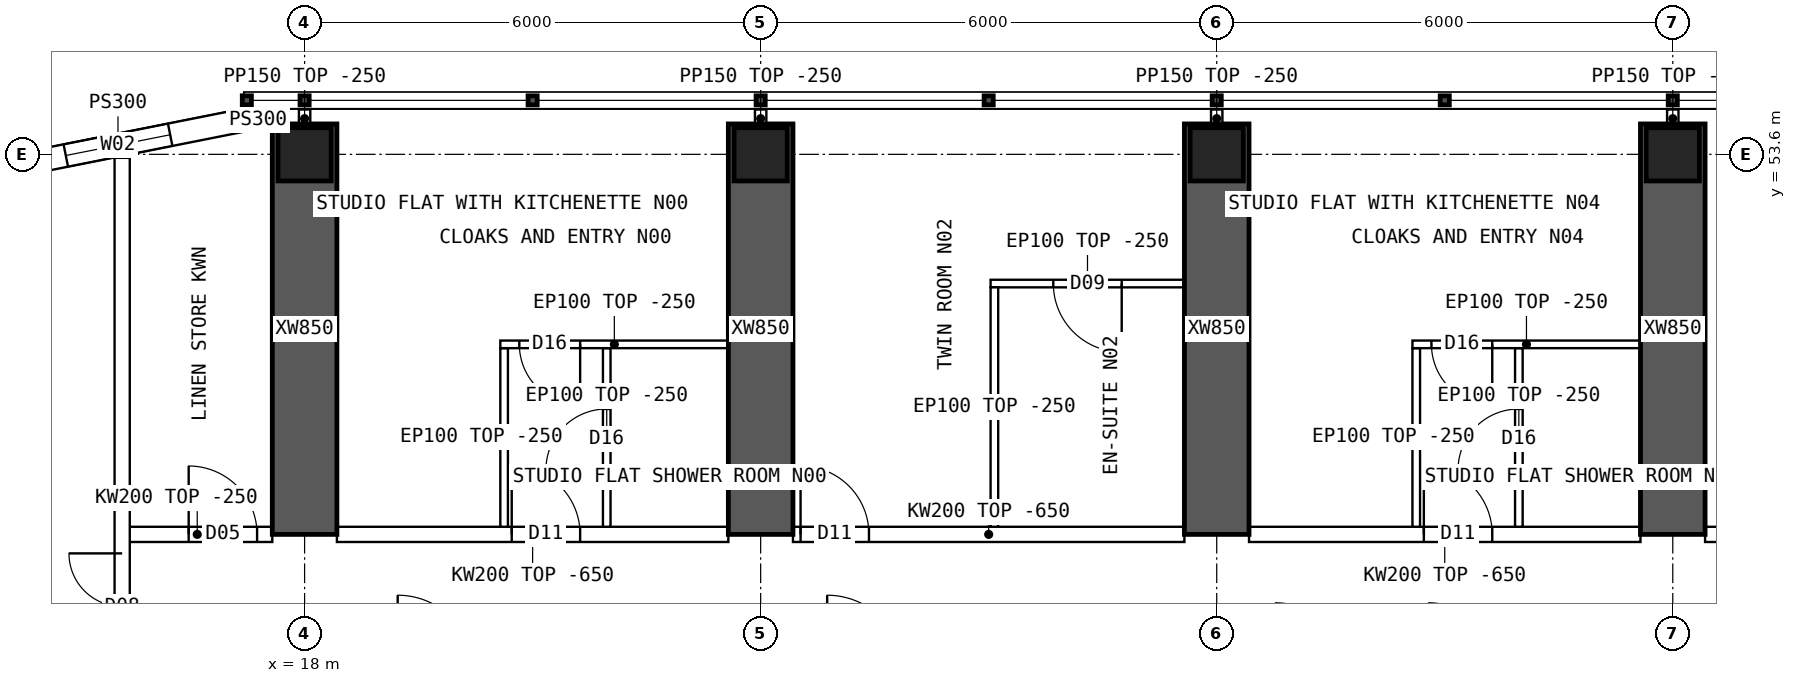
"""IFC4 building model, lengths in metres.
Left out: names, types, materials, properties, quantities, classifications, styles, units other than length and angle.
Written with IfcOpenShell. Run it as: python <this file> out.ifc"""

import sys

from ifc_helpers import new_model, si_unit, direction, frame, frame_2d, origin, origin_2d, place, context, subcontext, project, spatial, polyline, rectangle, hollow_rectangle, outline, extrude, element, fill, save


model = new_model("IFC4")
c1 = context("Model", 3, precision=1e-05, world=origin(), true_north=direction((0.0, 1.0)))
c2 = subcontext(c1, "Body", "Model", "MODEL_VIEW")
j1 = project(units=[si_unit("LENGTHUNIT", "METRE"), si_unit("PLANEANGLEUNIT", "RADIAN")], contexts=[c1])
p1 = place(None, origin())
s1 = spatial("IfcSite", under=j1, at=p1, CompositionType="ELEMENT")
p2 = place(p1, origin())
s2 = spatial("IfcBuilding", under=s1, at=p2, CompositionType="ELEMENT")
p3 = place(p2, frame((0.0, 0.0, 178.6)))
s3 = spatial("IfcBuildingStorey", under=s2, at=p3, CompositionType="ELEMENT", Elevation=178.6)
for number, where, z_axis, x_axis in (
    (1, (18.0, 53.6, 0.0), (0.0, 0.0, 1.0), (1.0, 0.0, 0.0)),
    (2, (24.0, 53.6, 0.0), (0.0, 0.0, 1.0), (1.0, 0.0, 0.0)),
    (3, (30.0, 53.6, 0.0), (0.0, 0.0, 1.0), (1.0, 0.0, 0.0)),
    (4, (36.0, 53.6, 0.0), (0.0, 0.0, 1.0), (1.0, 0.0, 0.0)),
):
    element("IfcColumn", number, at=place(p3, frame(where, z_axis=z_axis, x_axis=x_axis)), inside=s3, PredefinedType="COLUMN", context=c2, shape_type="SweptSolid", body=[
        extrude(hollow_rectangle(XDim=0.7, YDim=0.7, WallThickness=0.07, at=origin_2d()), origin(), (0.0, 0.0, 1.0), 3.75),
    ])
for number, where, z_axis, x_axis in (
    (5, (18.0, 48.6, 0.0), (0.0, 0.0, 1.0), (0.0, 1.0, 0.0)),
    (6, (24.0, 48.6, 0.0), (0.0, 0.0, 1.0), (0.0, 1.0, 0.0)),
    (7, (30.0, 48.6, 0.0), (0.0, 0.0, 1.0), (0.0, 1.0, 0.0)),
    (8, (36.0, 48.6, 0.0), (0.0, 0.0, 1.0), (0.0, 1.0, 0.0)),
):
    element("IfcWall", number, at=place(p3, frame(where, z_axis=z_axis, x_axis=x_axis)), inside=s3, PredefinedType="SHEAR", context=c2, shape_type="SweptSolid", body=[
        extrude(rectangle(XDim=5.4, YDim=0.85, at=frame_2d((2.7, 0.0))), origin(), (0.0, 0.0, 1.0), 3.75),
    ])
p4 = place(p3, frame((17.2, 54.05, 0.0), z_axis=(0.0, 0.0, 1.0), x_axis=(-0.98078325777, -0.195100490205, 0.0)))
e9 = element("IfcWall", 9, at=p4, inside=s3, PredefinedType="SOLIDWALL", context=c2, shape_type="SweptSolid", body=[
    extrude(outline(polyline([(-0.03, -0.15), (3.405, -0.15), (3.345, 0.15), (0.03, 0.15), (-0.03, -0.15)])), origin(), (0.0, 0.0, 1.0), 3.5),
])
p5 = place(p4, frame((0.988, 0.0, 0.9)))
e10 = element("IfcOpeningElement", 10, at=p5, cuts=e9, PredefinedType="OPENING", context=c2, shape_type="SweptSolid", body=[
    extrude(rectangle(XDim=1.4, YDim=1.8, at=frame_2d((0.7, 0.9))), frame((0.0, 0.16, 0.0), z_axis=(0.0, -1.0, 0.0), x_axis=(1.0, 0.0, 0.0)), (0.0, 0.0, 1.0), 0.32),
])
p6 = place(p3, frame((17.2, 54.05, 0.0), z_axis=(0.0, 0.0, 1.0), x_axis=(1.0, 0.0, 0.0)))
e11 = element("IfcWall", 11, at=p6, inside=s3, PredefinedType="SOLIDWALL", context=c2, shape_type="SweptSolid", body=[
    extrude(rectangle(XDim=0.375, YDim=0.3, at=frame_2d((0.188, 0.0))), origin(), (0.0, 0.0, 1.0), 3.5),
])
p7 = place(p3, frame((15.6, 48.6, 0.0), z_axis=(0.0, 0.0, 1.0), x_axis=(1.0, 0.0, 0.0)))
e12 = element("IfcWall", 12, at=p7, inside=s3, PredefinedType="SOLIDWALL", context=c2, shape_type="SweptSolid", body=[
    extrude(rectangle(XDim=1.975, YDim=0.2, at=frame_2d((0.987, 0.0))), origin(), (0.0, 0.0, 1.0), 3.5),
])
p8 = place(p7, frame((0.875, 0.0, 0.0)))
e13 = element("IfcOpeningElement", 13, at=p8, cuts=e12, PredefinedType="OPENING", context=c2, shape_type="SweptSolid", body=[
    extrude(rectangle(XDim=0.9, YDim=2.1, at=frame_2d((0.45, 1.05))), frame((0.0, 0.11, 0.0), z_axis=(0.0, -1.0, 0.0), x_axis=(1.0, 0.0, 0.0)), (0.0, 0.0, 1.0), 0.22),
])
p9 = place(p3, frame((18.425, 48.6, 0.0), z_axis=(0.0, 0.0, 1.0), x_axis=(1.0, 0.0, 0.0)))
e14 = element("IfcWall", 14, at=p9, inside=s3, PredefinedType="SOLIDWALL", context=c2, shape_type="SweptSolid", body=[
    extrude(outline(polyline([(0.0, 0.0), (5.15, 0.0), (5.15, 3.1), (0.0, 3.1), (0.0, 0.0)])), frame((0.0, 0.1, 0.0), z_axis=(0.0, -1.0, 0.0), x_axis=(1.0, 0.0, 0.0)), (0.0, 0.0, 1.0), 0.2),
])
p10 = place(p9, frame((2.3, 0.0, 0.0)))
e15 = element("IfcOpeningElement", 15, at=p10, cuts=e14, PredefinedType="OPENING", context=c2, shape_type="SweptSolid", body=[
    extrude(rectangle(XDim=0.9, YDim=2.1, at=frame_2d((0.45, 1.05))), frame((0.0, 0.11, 0.0), z_axis=(0.0, -1.0, 0.0), x_axis=(1.0, 0.0, 0.0)), (0.0, 0.0, 1.0), 0.22),
])
p11 = place(p3, frame((24.425, 48.6, 0.0), z_axis=(0.0, 0.0, 1.0), x_axis=(1.0, 0.0, 0.0)))
e16 = element("IfcWall", 16, at=p11, inside=s3, PredefinedType="SOLIDWALL", context=c2, shape_type="SweptSolid", body=[
    extrude(outline(polyline([(0.0, 0.0), (5.15, 0.0), (5.15, 3.1), (0.0, 3.1), (0.0, 0.0)])), frame((0.0, 0.1, 0.0), z_axis=(0.0, -1.0, 0.0), x_axis=(1.0, 0.0, 0.0)), (0.0, 0.0, 1.0), 0.2),
])
p12 = place(p11, frame((0.1, 0.0, 0.0)))
e17 = element("IfcOpeningElement", 17, at=p12, cuts=e16, PredefinedType="OPENING", context=c2, shape_type="SweptSolid", body=[
    extrude(rectangle(XDim=0.9, YDim=2.1, at=frame_2d((0.45, 1.05))), frame((0.0, 0.11, 0.0), z_axis=(0.0, -1.0, 0.0), x_axis=(1.0, 0.0, 0.0)), (0.0, 0.0, 1.0), 0.22),
])
p13 = place(p3, frame((30.425, 48.6, 0.0), z_axis=(0.0, 0.0, 1.0), x_axis=(1.0, 0.0, 0.0)))
e18 = element("IfcWall", 18, at=p13, inside=s3, PredefinedType="SOLIDWALL", context=c2, shape_type="SweptSolid", body=[
    extrude(outline(polyline([(0.0, 0.0), (5.15, 0.0), (5.15, 3.1), (0.0, 3.1), (0.0, 0.0)])), frame((0.0, 0.1, 0.0), z_axis=(0.0, -1.0, 0.0), x_axis=(1.0, 0.0, 0.0)), (0.0, 0.0, 1.0), 0.2),
])
p14 = place(p13, frame((2.3, 0.0, 0.0)))
e19 = element("IfcOpeningElement", 19, at=p14, cuts=e18, PredefinedType="OPENING", context=c2, shape_type="SweptSolid", body=[
    extrude(rectangle(XDim=0.9, YDim=2.1, at=frame_2d((0.45, 1.05))), frame((0.0, 0.11, 0.0), z_axis=(0.0, -1.0, 0.0), x_axis=(1.0, 0.0, 0.0)), (0.0, 0.0, 1.0), 0.22),
])
p15 = place(p3, frame((36.425, 48.6, 0.0), z_axis=(0.0, 0.0, 1.0), x_axis=(1.0, 0.0, 0.0)))
e20 = element("IfcWall", 20, at=p15, inside=s3, PredefinedType="SOLIDWALL", context=c2, shape_type="SweptSolid", body=[
    extrude(outline(polyline([(0.0, 0.0), (5.15, 0.0), (5.15, 3.1), (0.0, 3.1), (0.0, 0.0)])), frame((0.0, 0.1, 0.0), z_axis=(0.0, -1.0, 0.0), x_axis=(1.0, 0.0, 0.0)), (0.0, 0.0, 1.0), 0.2),
])
p16 = place(p15, frame((0.3, 0.0, 0.0)))
e21 = element("IfcOpeningElement", 21, at=p16, cuts=e20, PredefinedType="OPENING", context=c2, shape_type="SweptSolid", body=[
    extrude(rectangle(XDim=1.0, YDim=2.1, at=frame_2d((0.5, 1.05))), frame((0.0, 0.11, 0.0), z_axis=(0.0, -1.0, 0.0), x_axis=(1.0, 0.0, 0.0)), (0.0, 0.0, 1.0), 0.22),
])
p17 = place(p3, frame((20.575, 51.1, 0.0), z_axis=(0.0, 0.0, 1.0), x_axis=(1.0, 0.0, 0.0)))
e22 = element("IfcWall", 22, at=p17, inside=s3, PredefinedType="PARTITIONING", context=c2, shape_type="SweptSolid", body=[
    extrude(rectangle(XDim=3.0, YDim=0.1, at=frame_2d((1.5, 0.0))), origin(), (0.0, 0.0, 1.0), 3.5),
])
p18 = place(p17, frame((0.25, 0.0, 0.0)))
e23 = element("IfcOpeningElement", 23, at=p18, cuts=e22, PredefinedType="OPENING", context=c2, shape_type="SweptSolid", body=[
    extrude(rectangle(XDim=0.8, YDim=2.1, at=frame_2d((0.4, 1.05))), frame((0.0, 0.06, 0.0), z_axis=(0.0, -1.0, 0.0), x_axis=(1.0, 0.0, 0.0)), (0.0, 0.0, 1.0), 0.12),
])
p19 = place(p3, frame((20.625, 51.05, 0.0), z_axis=(0.0, 0.0, 1.0), x_axis=(0.0, -1.0, 0.0)))
e24 = element("IfcWall", 24, at=p19, inside=s3, PredefinedType="PARTITIONING", context=c2, shape_type="SweptSolid", body=[
    extrude(outline(polyline([(0.0, 0.0), (2.35, 0.0), (2.35, 3.1), (2.302, 3.1), (2.3, 3.5), (0.0, 3.5), (0.0, 0.0)])), frame((0.0, 0.05, 0.0), z_axis=(0.0, -1.0, 0.0), x_axis=(1.0, 0.0, 0.0)), (0.0, 0.0, 1.0), 0.1),
])
p20 = place(p3, frame((21.975, 51.05, 0.0), z_axis=(0.0, 0.0, 1.0), x_axis=(0.0, -1.0, 0.0)))
e25 = element("IfcWall", 25, at=p20, inside=s3, PredefinedType="PARTITIONING", context=c2, shape_type="SweptSolid", body=[
    extrude(outline(polyline([(0.0, 0.0), (2.35, 0.0), (2.35, 3.1), (2.302, 3.1), (2.3, 3.5), (0.0, 3.5), (0.0, 0.0)])), frame((0.0, 0.05, 0.0), z_axis=(0.0, -1.0, 0.0), x_axis=(1.0, 0.0, 0.0)), (0.0, 0.0, 1.0), 0.1),
])
p21 = place(p20, frame((0.8, 0.0, 0.0)))
e26 = element("IfcOpeningElement", 26, at=p21, cuts=e25, PredefinedType="OPENING", context=c2, shape_type="SweptSolid", body=[
    extrude(rectangle(XDim=0.8, YDim=2.1, at=frame_2d((0.4, 1.05))), frame((0.0, 0.06, 0.0), z_axis=(0.0, -1.0, 0.0), x_axis=(1.0, 0.0, 0.0)), (0.0, 0.0, 1.0), 0.12),
])
p22 = place(p3, frame((27.025, 51.9, 0.0), z_axis=(0.0, 0.0, 1.0), x_axis=(1.0, 0.0, 0.0)))
e27 = element("IfcWall", 27, at=p22, inside=s3, PredefinedType="PARTITIONING", context=c2, shape_type="SweptSolid", body=[
    extrude(rectangle(XDim=2.55, YDim=0.1, at=frame_2d((1.275, 0.0))), origin(), (0.0, 0.0, 1.0), 3.5),
])
p23 = place(p22, frame((0.825, 0.0, 0.0)))
e28 = element("IfcOpeningElement", 28, at=p23, cuts=e27, PredefinedType="OPENING", context=c2, shape_type="SweptSolid", body=[
    extrude(rectangle(XDim=0.9, YDim=2.1, at=frame_2d((0.45, 1.05))), frame((0.0, 0.06, 0.0), z_axis=(0.0, -1.0, 0.0), x_axis=(1.0, 0.0, 0.0)), (0.0, 0.0, 1.0), 0.12),
])
p24 = place(p3, frame((27.075, 51.85, 0.0), z_axis=(0.0, 0.0, 1.0), x_axis=(0.0, -1.0, 0.0)))
e29 = element("IfcWall", 29, at=p24, inside=s3, PredefinedType="PARTITIONING", context=c2, shape_type="SweptSolid", body=[
    extrude(outline(polyline([(0.0, 0.0), (3.15, 0.0), (3.15, 3.1), (3.102, 3.1), (3.1, 3.5), (0.0, 3.5), (0.0, 0.0)])), frame((0.0, 0.05, 0.0), z_axis=(0.0, -1.0, 0.0), x_axis=(1.0, 0.0, 0.0)), (0.0, 0.0, 1.0), 0.1),
])
p25 = place(p3, frame((32.575, 51.1, 0.0), z_axis=(0.0, 0.0, 1.0), x_axis=(1.0, 0.0, 0.0)))
e30 = element("IfcWall", 30, at=p25, inside=s3, PredefinedType="PARTITIONING", context=c2, shape_type="SweptSolid", body=[
    extrude(rectangle(XDim=3.0, YDim=0.1, at=frame_2d((1.5, 0.0))), origin(), (0.0, 0.0, 1.0), 3.5),
])
p26 = place(p25, frame((0.25, 0.0, 0.0)))
e31 = element("IfcOpeningElement", 31, at=p26, cuts=e30, PredefinedType="OPENING", context=c2, shape_type="SweptSolid", body=[
    extrude(rectangle(XDim=0.8, YDim=2.1, at=frame_2d((0.4, 1.05))), frame((0.0, 0.06, 0.0), z_axis=(0.0, -1.0, 0.0), x_axis=(1.0, 0.0, 0.0)), (0.0, 0.0, 1.0), 0.12),
])
p27 = place(p3, frame((32.625, 51.05, 0.0), z_axis=(0.0, 0.0, 1.0), x_axis=(0.0, -1.0, 0.0)))
e32 = element("IfcWall", 32, at=p27, inside=s3, PredefinedType="PARTITIONING", context=c2, shape_type="SweptSolid", body=[
    extrude(outline(polyline([(0.0, 0.0), (2.35, 0.0), (2.35, 3.1), (2.302, 3.1), (2.3, 3.5), (0.0, 3.5), (0.0, 0.0)])), frame((0.0, 0.05, 0.0), z_axis=(0.0, -1.0, 0.0), x_axis=(1.0, 0.0, 0.0)), (0.0, 0.0, 1.0), 0.1),
])
p28 = place(p3, frame((33.975, 51.05, 0.0), z_axis=(0.0, 0.0, 1.0), x_axis=(0.0, -1.0, 0.0)))
e33 = element("IfcWall", 33, at=p28, inside=s3, PredefinedType="PARTITIONING", context=c2, shape_type="SweptSolid", body=[
    extrude(outline(polyline([(0.0, 0.0), (2.35, 0.0), (2.35, 3.1), (2.302, 3.1), (2.3, 3.5), (0.0, 3.5), (0.0, 0.0)])), frame((0.0, 0.05, 0.0), z_axis=(0.0, -1.0, 0.0), x_axis=(1.0, 0.0, 0.0)), (0.0, 0.0, 1.0), 0.1),
])
p29 = place(p28, frame((0.8, 0.0, 0.0)))
e34 = element("IfcOpeningElement", 34, at=p29, cuts=e33, PredefinedType="OPENING", context=c2, shape_type="SweptSolid", body=[
    extrude(rectangle(XDim=0.8, YDim=2.1, at=frame_2d((0.4, 1.05))), frame((0.0, 0.06, 0.0), z_axis=(0.0, -1.0, 0.0), x_axis=(1.0, 0.0, 0.0)), (0.0, 0.0, 1.0), 0.12),
])
p30 = place(p3, frame((15.6, 10.446, 0.0), z_axis=(0.0, 0.0, 1.0), x_axis=(0.0, 1.0, 0.0)))
e35 = element("IfcWall", 35, at=p30, inside=s3, PredefinedType="SOLIDWALL", context=c2, shape_type="SweptSolid", body=[
    extrude(rectangle(XDim=43.107, YDim=0.2, at=frame_2d((21.554, 0.0))), origin(), (0.0, 0.0, 1.0), 3.5),
])
p31 = place(p30, frame((5.104, 0.0, 0.0)))
e36 = element("IfcOpeningElement", 36, at=p31, cuts=e35, PredefinedType="OPENING", context=c2, shape_type="SweptSolid", body=[
    extrude(rectangle(XDim=1.4, YDim=2.1, at=frame_2d((0.7, 1.05))), frame((0.0, 0.11, 0.0), z_axis=(0.0, -1.0, 0.0), x_axis=(1.0, 0.0, 0.0)), (0.0, 0.0, 1.0), 0.22),
])
p32 = place(p30, frame((36.504, 0.0, 0.0)))
e37 = element("IfcOpeningElement", 37, at=p32, cuts=e35, PredefinedType="OPENING", context=c2, shape_type="SweptSolid", body=[
    extrude(rectangle(XDim=1.4, YDim=2.1, at=frame_2d((0.7, 1.05))), frame((0.0, 0.11, 0.0), z_axis=(0.0, -1.0, 0.0), x_axis=(1.0, 0.0, 0.0)), (0.0, 0.0, 1.0), 0.22),
])
for number, where, z_axis, x_axis in (
    (38, (18.0, 53.95, 0.0), (0.0, 0.0, 1.0), (0.0, 1.0, 0.0)),
    (39, (24.0, 53.95, 0.0), (0.0, 0.0, 1.0), (0.0, 1.0, 0.0)),
    (40, (30.0, 53.95, 0.0), (0.0, 0.0, 1.0), (0.0, 1.0, 0.0)),
    (41, (36.0, 53.95, 0.0), (0.0, 0.0, 1.0), (0.0, 1.0, 0.0)),
):
    element("IfcWall", number, at=place(p3, frame(where, z_axis=z_axis, x_axis=x_axis)), inside=s3, PredefinedType="PARTITIONING", context=c2, shape_type="SweptSolid", body=[
        extrude(rectangle(XDim=0.24, YDim=0.15, at=frame_2d((0.12, 0.0))), origin(), (0.0, 0.0, 1.0), 3.5),
    ])
p33 = place(p5, origin())
e42 = element("IfcWindow", 42, at=p33, inside=s3, PartitioningType="SINGLE_PANEL", PredefinedType="WINDOW", context=c2, shape_type="SweptSolid", body=[
    extrude(rectangle(XDim=1.4, YDim=1.8, at=frame_2d((0.7, 0.9))), frame((0.0, 0.03, 0.0), z_axis=(0.0, -1.0, 0.0), x_axis=(1.0, 0.0, 0.0)), (0.0, 0.0, 1.0), 0.06),
])
fill(e10, e42)
p34 = place(p18, origin())
e43 = element("IfcDoor", 43, at=p34, inside=s3, OperationType="SINGLE_SWING_RIGHT", PredefinedType="DOOR", context=c2, shape_type="SweptSolid", body=[
    extrude(rectangle(XDim=0.8, YDim=2.1, at=frame_2d((0.4, 1.05))), frame((0.0, 0.025, 0.0), z_axis=(0.0, -1.0, 0.0), x_axis=(1.0, 0.0, 0.0)), (0.0, 0.0, 1.0), 0.05),
])
fill(e23, e43)
p35 = place(p21, origin())
e44 = element("IfcDoor", 44, at=p35, inside=s3, OperationType="SINGLE_SWING_RIGHT", PredefinedType="DOOR", context=c2, shape_type="SweptSolid", body=[
    extrude(rectangle(XDim=0.8, YDim=2.1, at=frame_2d((0.4, 1.05))), frame((0.0, 0.025, 0.0), z_axis=(0.0, -1.0, 0.0), x_axis=(1.0, 0.0, 0.0)), (0.0, 0.0, 1.0), 0.05),
])
fill(e26, e44)
p36 = place(p10, origin())
e45 = element("IfcDoor", 45, at=p36, inside=s3, OperationType="SINGLE_SWING_LEFT", PredefinedType="DOOR", context=c2, shape_type="SweptSolid", body=[
    extrude(rectangle(XDim=0.9, YDim=2.1, at=frame_2d((0.45, 1.05))), frame((0.0, 0.025, 0.0), z_axis=(0.0, -1.0, 0.0), x_axis=(1.0, 0.0, 0.0)), (0.0, 0.0, 1.0), 0.05),
])
fill(e15, e45)
p37 = place(p23, origin())
e46 = element("IfcDoor", 46, at=p37, inside=s3, OperationType="SINGLE_SWING_RIGHT", PredefinedType="DOOR", context=c2, shape_type="SweptSolid", body=[
    extrude(rectangle(XDim=0.9, YDim=2.1, at=frame_2d((0.45, 1.05))), frame((0.0, 0.025, 0.0), z_axis=(0.0, -1.0, 0.0), x_axis=(1.0, 0.0, 0.0)), (0.0, 0.0, 1.0), 0.05),
])
fill(e28, e46)
p38 = place(p12, origin())
e47 = element("IfcDoor", 47, at=p38, inside=s3, OperationType="SINGLE_SWING_LEFT", PredefinedType="DOOR", context=c2, shape_type="SweptSolid", body=[
    extrude(rectangle(XDim=0.9, YDim=2.1, at=frame_2d((0.45, 1.05))), frame((0.0, 0.025, 0.0), z_axis=(0.0, -1.0, 0.0), x_axis=(1.0, 0.0, 0.0)), (0.0, 0.0, 1.0), 0.05),
])
fill(e17, e47)
p39 = place(p26, origin())
e48 = element("IfcDoor", 48, at=p39, inside=s3, OperationType="SINGLE_SWING_RIGHT", PredefinedType="DOOR", context=c2, shape_type="SweptSolid", body=[
    extrude(rectangle(XDim=0.8, YDim=2.1, at=frame_2d((0.4, 1.05))), frame((0.0, 0.025, 0.0), z_axis=(0.0, -1.0, 0.0), x_axis=(1.0, 0.0, 0.0)), (0.0, 0.0, 1.0), 0.05),
])
fill(e31, e48)
p40 = place(p29, origin())
e49 = element("IfcDoor", 49, at=p40, inside=s3, OperationType="SINGLE_SWING_RIGHT", PredefinedType="DOOR", context=c2, shape_type="SweptSolid", body=[
    extrude(rectangle(XDim=0.8, YDim=2.1, at=frame_2d((0.4, 1.05))), frame((0.0, 0.025, 0.0), z_axis=(0.0, -1.0, 0.0), x_axis=(1.0, 0.0, 0.0)), (0.0, 0.0, 1.0), 0.05),
])
fill(e34, e49)
p41 = place(p14, origin())
e50 = element("IfcDoor", 50, at=p41, inside=s3, OperationType="SINGLE_SWING_LEFT", PredefinedType="DOOR", context=c2, shape_type="SweptSolid", body=[
    extrude(rectangle(XDim=0.9, YDim=2.1, at=frame_2d((0.45, 1.05))), frame((0.0, 0.025, 0.0), z_axis=(0.0, -1.0, 0.0), x_axis=(1.0, 0.0, 0.0)), (0.0, 0.0, 1.0), 0.05),
])
fill(e19, e50)
p42 = place(p32, origin())
e51 = element("IfcDoor", 51, at=p42, inside=s3, OperationType="DOUBLE_DOOR_SINGLE_SWING", PredefinedType="DOOR", context=c2, shape_type="SweptSolid", body=[
    extrude(rectangle(XDim=1.4, YDim=2.1, at=frame_2d((0.7, 1.05))), frame((0.0, 0.025, 0.0), z_axis=(0.0, -1.0, 0.0), x_axis=(1.0, 0.0, 0.0)), (0.0, 0.0, 1.0), 0.05),
])
fill(e37, e51)
p43 = place(p8, origin())
e52 = element("IfcDoor", 52, at=p43, inside=s3, OperationType="SINGLE_SWING_LEFT", PredefinedType="DOOR", context=c2, shape_type="SweptSolid", body=[
    extrude(rectangle(XDim=0.9, YDim=2.1, at=frame_2d((0.45, 1.05))), frame((0.0, 0.025, 0.0), z_axis=(0.0, -1.0, 0.0), x_axis=(1.0, 0.0, 0.0)), (0.0, 0.0, 1.0), 0.05),
])
fill(e13, e52)
save(model, sys.argv[1])
